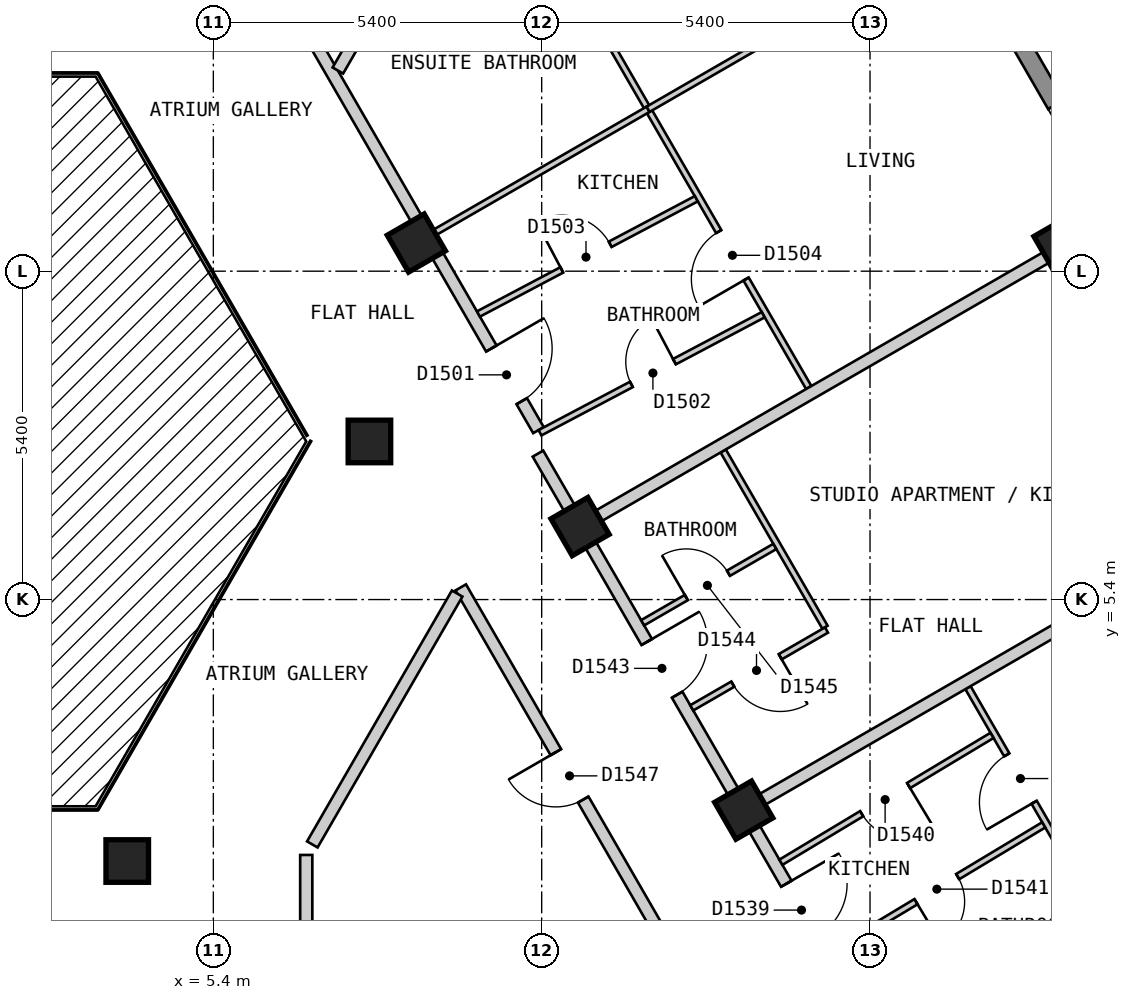
"""IFC4 building model, lengths in metres.
Left out: names, types, materials, properties, quantities, classifications, styles, units other than length and angle.
Written with IfcOpenShell. Run it as: python <this file> out.ifc"""

import sys

from ifc_helpers import new_model, si_unit, direction, frame, frame_2d, origin, origin_2d, place, context, subcontext, project, spatial, polyline, rectangle, outline, extrude, element, fill, save


model = new_model("IFC4")
c1 = context("Model", 3, precision=1e-05, world=origin(), true_north=direction((0.0, 1.0)))
c2 = subcontext(c1, "Body", "Model", "MODEL_VIEW")
j1 = project(units=[si_unit("LENGTHUNIT", "METRE"), si_unit("PLANEANGLEUNIT", "RADIAN")], contexts=[c1])
p1 = place(None, origin())
s1 = spatial("IfcSite", under=j1, at=p1, CompositionType="ELEMENT")
p2 = place(p1, origin())
s2 = spatial("IfcBuilding", under=s1, at=p2, CompositionType="ELEMENT")
p3 = place(p2, frame((0.0, 0.0, 196.2)))
s3 = spatial("IfcBuildingStorey", under=s2, at=p3, CompositionType="ELEMENT", Elevation=196.2)
p4 = place(p3, frame((19.442, 11.225, 0.0), z_axis=(0.0, 0.0, 1.0), x_axis=(-0.5, 0.866025403784, 0.0)))
e1 = element("IfcColumn", 1, at=p4, inside=s3, PredefinedType="COLUMN", context=c2, shape_type="SweptSolid", body=[
    extrude(rectangle(XDim=0.8, YDim=0.8, at=origin_2d()), origin(), (0.0, 0.0, 1.0), 3.0),
])
for number, where, z_axis, x_axis in (
    (2, (14.123, 1.937, 0.0), (0.0, 0.0, 1.0), (-0.5, 0.866, 0.0)),
    (3, (3.984, 1.1, 0.0), (0.0, 0.0, 1.0), (1.0, 0.0, 0.0)),
    (4, (11.431, 6.6, 0.0), (0.0, 0.0, 1.0), (-0.5, 0.866, 0.0)),
    (5, (7.967, 8.0, 0.0), (0.0, 0.0, 1.0), (1.0, 0.0, 0.0)),
    (6, (8.739, 11.263, 0.0), (0.0, 0.0, 1.0), (-0.5, 0.866, 0.0)),
):
    element("IfcColumn", number, at=place(p3, frame(where, z_axis=z_axis, x_axis=x_axis)), inside=s3, PredefinedType="COLUMN", context=c2, shape_type="SweptSolid", body=[
        extrude(rectangle(XDim=0.7, YDim=0.7, at=origin_2d()), origin(), (0.0, 0.0, 1.0), 3.0),
    ])
p5 = place(p3, frame((26.024, 1.825, 0.0), z_axis=(0.0, 0.0, 1.0), x_axis=(-0.500010537973, 0.866019319597, 0.0)))
e7 = element("IfcWall", 7, at=p5, inside=s3, PredefinedType="SOLIDWALL", context=c2, shape_type="SweptSolid", body=[
    extrude(outline(polyline([(0.0, -0.15), (22.863, -0.15), (22.783, 0.15), (0.08, 0.15), (0.0, -0.15)])), origin(), (0.0, 0.0, 1.0), 2.6),
])
p6 = place(p5, frame((1.259, 0.0, 0.15)))
e8 = element("IfcOpeningElement", 8, at=p6, cuts=e7, PredefinedType="OPENING", context=c2, shape_type="SweptSolid", body=[
    extrude(rectangle(XDim=1.5, YDim=2.1, at=frame_2d((0.75, 1.05))), frame((0.0, 0.16, 0.0), z_axis=(0.0, -1.0, 0.0), x_axis=(1.0, 0.0, 0.0)), (0.0, 0.0, 1.0), 0.32),
])
p7 = place(p5, frame((3.952, 0.0, 0.15)))
e9 = element("IfcOpeningElement", 9, at=p7, cuts=e7, PredefinedType="OPENING", context=c2, shape_type="SweptSolid", body=[
    extrude(rectangle(XDim=1.5, YDim=2.1, at=frame_2d((0.75, 1.05))), frame((0.0, 0.16, 0.0), z_axis=(0.0, -1.0, 0.0), x_axis=(1.0, 0.0, 0.0)), (0.0, 0.0, 1.0), 0.32),
])
p8 = place(p5, frame((6.644, 0.0, 0.15)))
e10 = element("IfcOpeningElement", 10, at=p8, cuts=e7, PredefinedType="OPENING", context=c2, shape_type="SweptSolid", body=[
    extrude(rectangle(XDim=1.5, YDim=2.1, at=frame_2d((0.75, 1.05))), frame((0.0, 0.16, 0.0), z_axis=(0.0, -1.0, 0.0), x_axis=(1.0, 0.0, 0.0)), (0.0, 0.0, 1.0), 0.32),
])
p9 = place(p5, frame((9.335, 0.0, 0.15)))
e11 = element("IfcOpeningElement", 11, at=p9, cuts=e7, PredefinedType="OPENING", context=c2, shape_type="SweptSolid", body=[
    extrude(rectangle(XDim=1.5, YDim=2.1, at=frame_2d((0.75, 1.05))), frame((0.0, 0.16, 0.0), z_axis=(0.0, -1.0, 0.0), x_axis=(1.0, 0.0, 0.0)), (0.0, 0.0, 1.0), 0.32),
])
p10 = place(p5, frame((12.028, 0.0, 0.15)))
e12 = element("IfcOpeningElement", 12, at=p10, cuts=e7, PredefinedType="OPENING", context=c2, shape_type="SweptSolid", body=[
    extrude(rectangle(XDim=1.5, YDim=2.1, at=frame_2d((0.75, 1.05))), frame((0.0, 0.16, 0.0), z_axis=(0.0, -1.0, 0.0), x_axis=(1.0, 0.0, 0.0)), (0.0, 0.0, 1.0), 0.32),
])
p11 = place(p5, frame((14.72, 0.0, 0.15)))
e13 = element("IfcOpeningElement", 13, at=p11, cuts=e7, PredefinedType="OPENING", context=c2, shape_type="SweptSolid", body=[
    extrude(rectangle(XDim=1.5, YDim=2.1, at=frame_2d((0.75, 1.05))), frame((0.0, 0.16, 0.0), z_axis=(0.0, -1.0, 0.0), x_axis=(1.0, 0.0, 0.0)), (0.0, 0.0, 1.0), 0.32),
])
p12 = place(p5, frame((17.411, 0.0, 0.15)))
e14 = element("IfcOpeningElement", 14, at=p12, cuts=e7, PredefinedType="OPENING", context=c2, shape_type="SweptSolid", body=[
    extrude(rectangle(XDim=1.5, YDim=2.1, at=frame_2d((0.75, 1.05))), frame((0.0, 0.16, 0.0), z_axis=(0.0, -1.0, 0.0), x_axis=(1.0, 0.0, 0.0)), (0.0, 0.0, 1.0), 0.32),
])
p13 = place(p5, frame((20.104, 0.0, 0.15)))
e15 = element("IfcOpeningElement", 15, at=p13, cuts=e7, PredefinedType="OPENING", context=c2, shape_type="SweptSolid", body=[
    extrude(rectangle(XDim=1.5, YDim=2.1, at=frame_2d((0.75, 1.05))), frame((0.0, 0.16, 0.0), z_axis=(0.0, -1.0, 0.0), x_axis=(1.0, 0.0, 0.0)), (0.0, 0.0, 1.0), 0.32),
])
p14 = place(p3, frame((9.469, 5.6, 0.0), z_axis=(0.0, 0.0, 1.0), x_axis=(0.499964524401, -0.866045884662, 0.0)))
e16 = element("IfcWall", 16, at=p14, inside=s3, PredefinedType="PARTITIONING", context=c2, shape_type="SweptSolid", body=[
    extrude(rectangle(XDim=7.042, YDim=0.2, at=frame_2d((3.521, 0.0))), origin(), (0.0, 0.0, 1.0), 2.6),
])
p15 = place(p14, frame((3.129, 0.0, 0.0)))
e17 = element("IfcOpeningElement", 17, at=p15, cuts=e16, PredefinedType="OPENING", context=c2, shape_type="SweptSolid", body=[
    extrude(rectangle(XDim=0.9, YDim=2.1, at=frame_2d((0.45, 1.05))), frame((0.0, 0.11, 0.0), z_axis=(0.0, -1.0, 0.0), x_axis=(1.0, 0.0, 0.0)), (0.0, 0.0, 1.0), 0.22),
])
p16 = place(p3, frame((10.739, 7.8, 0.0), z_axis=(0.0, 0.0, 1.0), x_axis=(0.500023726918, -0.866011704609, 0.0)))
e18 = element("IfcWall", 18, at=p16, inside=s3, PredefinedType="PARTITIONING", context=c2, shape_type="SweptSolid", body=[
    extrude(rectangle(XDim=9.47, YDim=0.2, at=frame_2d((4.735, 0.0))), origin(), (0.0, 0.0, 1.0), 2.6),
])
p17 = place(p16, frame((8.168, 0.0, 0.0)))
e19 = element("IfcOpeningElement", 19, at=p17, cuts=e18, PredefinedType="OPENING", context=c2, shape_type="SweptSolid", body=[
    extrude(rectangle(XDim=1.0, YDim=2.1, at=frame_2d((0.5, 1.05))), frame((0.0, 0.11, 0.0), z_axis=(0.0, -1.0, 0.0), x_axis=(1.0, 0.0, 0.0)), (0.0, 0.0, 1.0), 0.22),
])
p18 = place(p16, frame((3.578, 0.0, 0.0)))
e20 = element("IfcOpeningElement", 20, at=p18, cuts=e18, PredefinedType="OPENING", context=c2, shape_type="SweptSolid", body=[
    extrude(rectangle(XDim=1.0, YDim=2.1, at=frame_2d((0.5, 1.05))), frame((0.0, 0.11, 0.0), z_axis=(0.0, -1.0, 0.0), x_axis=(1.0, 0.0, 0.0)), (0.0, 0.0, 1.0), 0.22),
])
p19 = place(p3, frame((5.485, 17.3, 0.0), z_axis=(0.0, 0.0, 1.0), x_axis=(0.499998905622, -0.866026035623, 0.0)))
e21 = element("IfcWall", 21, at=p19, inside=s3, PredefinedType="PARTITIONING", context=c2, shape_type="SweptSolid", body=[
    extrude(rectangle(XDim=10.524, YDim=0.2, at=frame_2d((5.262, 0.0))), origin(), (0.0, 0.0, 1.0), 2.6),
])
p20 = place(p19, frame((8.974, 0.0, 0.0)))
e22 = element("IfcOpeningElement", 22, at=p20, cuts=e21, PredefinedType="OPENING", context=c2, shape_type="SweptSolid", body=[
    extrude(rectangle(XDim=1.0, YDim=2.1, at=frame_2d((0.5, 1.05))), frame((0.0, 0.11, 0.0), z_axis=(0.0, -1.0, 0.0), x_axis=(1.0, 0.0, 0.0)), (0.0, 0.0, 1.0), 0.22),
])
p21 = place(p3, frame((7.028, 1.373, 0.0), z_axis=(0.0, 0.0, 1.0), x_axis=(0.499953126767, 0.866052464367, 0.0)))
e23 = element("IfcWall", 23, at=p21, inside=s3, PredefinedType="PARTITIONING", context=c2, shape_type="SweptSolid", body=[
    extrude(rectangle(XDim=4.764, YDim=0.2, at=frame_2d((2.382, 0.0))), origin(), (0.0, 0.0, 1.0), 2.6),
])
p22 = place(p3, frame((6.928, -2.8, 0.0), z_axis=(0.0, 0.0, 1.0), x_axis=(0.0, 1.0, 0.0)))
e24 = element("IfcWall", 24, at=p22, inside=s3, PredefinedType="PARTITIONING", context=c2, shape_type="SweptSolid", body=[
    extrude(rectangle(XDim=4.0, YDim=0.2, at=frame_2d((2.0, 0.0))), origin(), (0.0, 0.0, 1.0), 2.6),
])
p23 = place(p3, frame((13.785, 7.844, 0.0), z_axis=(0.0, 0.0, 1.0), x_axis=(0.500176784828, -0.865923312955, 0.0)))
e25 = element("IfcWall", 25, at=p23, inside=s3, PredefinedType="PARTITIONING", context=c2, shape_type="SweptSolid", body=[
    extrude(rectangle(XDim=3.349, YDim=0.1, at=frame_2d((1.674, 0.0))), origin(), (0.0, 0.0, 1.0), 2.6),
])
p24 = place(p3, frame((17.811, 3.951, 0.0), z_axis=(0.0, 0.0, 1.0), x_axis=(0.499976149225, -0.866039173598, 0.0)))
e26 = element("IfcWall", 26, at=p24, inside=s3, PredefinedType="PARTITIONING", context=c2, shape_type="SweptSolid", body=[
    extrude(rectangle(XDim=2.888, YDim=0.1, at=frame_2d((1.444, 0.0))), origin(), (0.0, 0.0, 1.0), 2.6),
])
p25 = place(p24, frame((1.276, 0.0, 0.0)))
e27 = element("IfcOpeningElement", 27, at=p25, cuts=e26, PredefinedType="OPENING", context=c2, shape_type="SweptSolid", body=[
    extrude(rectangle(XDim=0.9, YDim=2.1, at=frame_2d((0.45, 1.05))), frame((0.0, 0.06, 0.0), z_axis=(0.0, -1.0, 0.0), x_axis=(1.0, 0.0, 0.0)), (0.0, 0.0, 1.0), 0.12),
])
p26 = place(p3, frame((9.883, 18.082, 0.0), z_axis=(0.0, 0.0, 1.0), x_axis=(0.500004428835, -0.86602284678, 0.0)))
e28 = element("IfcWall", 28, at=p26, inside=s3, PredefinedType="PARTITIONING", context=c2, shape_type="SweptSolid", body=[
    extrude(rectangle(XDim=10.618, YDim=0.1, at=frame_2d((5.309, 0.0))), origin(), (0.0, 0.0, 1.0), 2.6),
])
p27 = place(p26, frame((7.657, 0.0, 0.0)))
e29 = element("IfcOpeningElement", 29, at=p27, cuts=e28, PredefinedType="OPENING", context=c2, shape_type="SweptSolid", body=[
    extrude(rectangle(XDim=0.9, YDim=2.1, at=frame_2d((0.45, 1.05))), frame((0.0, 0.06, 0.0), z_axis=(0.0, -1.0, 0.0), x_axis=(1.0, 0.0, 0.0)), (0.0, 0.0, 1.0), 0.12),
])
p28 = place(p26, frame((2.242, 0.0, 0.0)))
e30 = element("IfcOpeningElement", 30, at=p28, cuts=e28, PredefinedType="OPENING", context=c2, shape_type="SweptSolid", body=[
    extrude(rectangle(XDim=0.8, YDim=2.1, at=frame_2d((0.4, 1.05))), frame((0.0, 0.06, 0.0), z_axis=(0.0, -1.0, 0.0), x_axis=(1.0, 0.0, 0.0)), (0.0, 0.0, 1.0), 0.12),
])
p29 = place(p3, frame((9.76, 10.096, 0.0), z_axis=(0.0, 0.0, 1.0), x_axis=(0.883925629136, 0.467627503636, 0.0)))
e31 = element("IfcWall", 31, at=p29, inside=s3, PredefinedType="PARTITIONING", context=c2, shape_type="SweptSolid", body=[
    extrude(rectangle(XDim=4.052, YDim=0.1, at=frame_2d((2.026, 0.0))), origin(), (0.0, 0.0, 1.0), 2.6),
])
p30 = place(p29, frame((1.551, 0.0, 0.0)))
e32 = element("IfcOpeningElement", 32, at=p30, cuts=e31, PredefinedType="OPENING", context=c2, shape_type="SweptSolid", body=[
    extrude(rectangle(XDim=0.9, YDim=2.1, at=frame_2d((0.45, 1.05))), frame((0.0, 0.06, 0.0), z_axis=(0.0, -1.0, 0.0), x_axis=(1.0, 0.0, 0.0)), (0.0, 0.0, 1.0), 0.12),
])
p31 = place(p3, frame((10.772, 8.143, 0.0), z_axis=(0.0, 0.0, 1.0), x_axis=(0.884049480227, 0.467393320995, 0.0)))
e33 = element("IfcWall", 33, at=p31, inside=s3, PredefinedType="PARTITIONING", context=c2, shape_type="SweptSolid", body=[
    extrude(rectangle(XDim=4.153, YDim=0.1, at=frame_2d((2.076, 0.0))), origin(), (0.0, 0.0, 1.0), 2.6),
])
p32 = place(p31, frame((1.701, 0.0, 0.0)))
e34 = element("IfcOpeningElement", 34, at=p32, cuts=e33, PredefinedType="OPENING", context=c2, shape_type="SweptSolid", body=[
    extrude(rectangle(XDim=0.8, YDim=2.1, at=frame_2d((0.4, 1.05))), frame((0.0, 0.06, 0.0), z_axis=(0.0, -1.0, 0.0), x_axis=(1.0, 0.0, 0.0)), (0.0, 0.0, 1.0), 0.12),
])
p33 = place(p3, frame((13.268, 3.619, 0.0), z_axis=(0.0, 0.0, 1.0), x_axis=(0.865902724456, 0.500212426655, 0.0)))
e35 = element("IfcWall", 35, at=p33, inside=s3, PredefinedType="PARTITIONING", context=c2, shape_type="SweptSolid", body=[
    extrude(rectangle(XDim=2.559, YDim=0.1, at=frame_2d((1.28, 0.0))), origin(), (0.0, 0.0, 1.0), 2.6),
])
p34 = place(p33, frame((0.78, 0.0, 0.0)))
e36 = element("IfcOpeningElement", 36, at=p34, cuts=e35, PredefinedType="OPENING", context=c2, shape_type="SweptSolid", body=[
    extrude(rectangle(XDim=0.9, YDim=2.1, at=frame_2d((0.45, 1.05))), frame((0.0, 0.06, 0.0), z_axis=(0.0, -1.0, 0.0), x_axis=(1.0, 0.0, 0.0)), (0.0, 0.0, 1.0), 0.12),
])
p35 = place(p3, frame((12.46, 5.018, 0.0), z_axis=(0.0, 0.0, 1.0), x_axis=(0.866080321209, 0.499904868165, 0.0)))
e37 = element("IfcWall", 37, at=p35, inside=s3, PredefinedType="PARTITIONING", context=c2, shape_type="SweptSolid", body=[
    extrude(rectangle(XDim=2.51, YDim=0.1, at=frame_2d((1.255, 0.0))), origin(), (0.0, 0.0, 1.0), 2.6),
])
p36 = place(p35, frame((0.83, 0.0, 0.0)))
e38 = element("IfcOpeningElement", 38, at=p36, cuts=e37, PredefinedType="OPENING", context=c2, shape_type="SweptSolid", body=[
    extrude(rectangle(XDim=0.8, YDim=2.1, at=frame_2d((0.4, 1.05))), frame((0.0, 0.06, 0.0), z_axis=(0.0, -1.0, 0.0), x_axis=(1.0, 0.0, 0.0)), (0.0, 0.0, 1.0), 0.12),
])
p37 = place(p3, frame((8.999, 11.413, 0.0), z_axis=(0.0, 0.0, 1.0), x_axis=(0.86606561423, 0.499930346997, 0.0)))
e39 = element("IfcWall", 39, at=p37, inside=s3, PredefinedType="PARTITIONING", context=c2, shape_type="SweptSolid", body=[
    extrude(rectangle(XDim=4.1, YDim=0.1, at=frame_2d((2.05, 0.0))), origin(), (0.0, 0.0, 1.0), 2.6),
])
p38 = place(p3, frame((14.734, 1.08, 0.0), z_axis=(0.0, 0.0, 1.0), x_axis=(0.857205608004, 0.514974315482, 0.0)))
e40 = element("IfcWall", 40, at=p38, inside=s3, PredefinedType="PARTITIONING", context=c2, shape_type="SweptSolid", body=[
    extrude(rectangle(XDim=4.051, YDim=0.1, at=frame_2d((2.025, 0.0))), origin(), (0.0, 0.0, 1.0), 2.6),
])
p39 = place(p38, frame((1.55, 0.0, 0.0)))
e41 = element("IfcOpeningElement", 41, at=p39, cuts=e40, PredefinedType="OPENING", context=c2, shape_type="SweptSolid", body=[
    extrude(rectangle(XDim=0.9, YDim=2.1, at=frame_2d((0.45, 1.05))), frame((0.0, 0.06, 0.0), z_axis=(0.0, -1.0, 0.0), x_axis=(1.0, 0.0, 0.0)), (0.0, 0.0, 1.0), 0.12),
])
p40 = place(p3, frame((15.499, -0.444, 0.0), z_axis=(0.0, 0.0, 1.0), x_axis=(0.857061798163, 0.515213619899, 0.0)))
e42 = element("IfcWall", 42, at=p40, inside=s3, PredefinedType="PARTITIONING", context=c2, shape_type="SweptSolid", body=[
    extrude(rectangle(XDim=4.15, YDim=0.1, at=frame_2d((2.075, 0.0))), origin(), (0.0, 0.0, 1.0), 2.6),
])
p41 = place(p40, frame((1.7, 0.0, 0.0)))
e43 = element("IfcOpeningElement", 43, at=p41, cuts=e42, PredefinedType="OPENING", context=c2, shape_type="SweptSolid", body=[
    extrude(rectangle(XDim=0.8, YDim=2.1, at=frame_2d((0.4, 1.05))), frame((0.0, 0.06, 0.0), z_axis=(0.0, -1.0, 0.0), x_axis=(1.0, 0.0, 0.0)), (0.0, 0.0, 1.0), 0.12),
])
p42 = place(p3, frame((7.448, 14.1, 0.0), z_axis=(0.0, 0.0, 1.0), x_axis=(0.499961462843, 0.866047652079, 0.0)))
e44 = element("IfcWall", 44, at=p42, inside=s3, PredefinedType="PARTITIONING", context=c2, shape_type="SweptSolid", body=[
    extrude(rectangle(XDim=4.362, YDim=0.2, at=frame_2d((2.181, 0.0))), origin(), (0.0, 0.0, 1.0), 2.6),
])
p43 = place(p3, frame((14.21, 1.987, 0.0), z_axis=(0.0, 0.0, 1.0), x_axis=(0.866022959057, 0.500004234368, 0.0)))
e45 = element("IfcWall", 45, at=p43, inside=s3, PredefinedType="PARTITIONING", context=c2, shape_type="SweptSolid", body=[
    extrude(rectangle(XDim=10.0, YDim=0.2, at=frame_2d((5.0, 0.0))), origin(), (0.0, 0.0, 1.0), 2.6),
])
p44 = place(p3, frame((11.518, 6.65, 0.0), z_axis=(0.0, 0.0, 1.0), x_axis=(0.866016855193, 0.500014806302, 0.0)))
e46 = element("IfcWall", 46, at=p44, inside=s3, PredefinedType="PARTITIONING", context=c2, shape_type="SweptSolid", body=[
    extrude(rectangle(XDim=10.0, YDim=0.2, at=frame_2d((5.0, 0.0))), origin(), (0.0, 0.0, 1.0), 2.6),
])
p45 = place(p3, frame((12.55, 13.463, 0.0), z_axis=(0.0, 0.0, 1.0), x_axis=(0.866004402611, 0.500036373335, 0.0)))
e47 = element("IfcWall", 47, at=p45, inside=s3, PredefinedType="PARTITIONING", context=c2, shape_type="SweptSolid", body=[
    extrude(rectangle(XDim=5.7, YDim=0.1, at=frame_2d((2.85, 0.0))), origin(), (0.0, 0.0, 1.0), 2.6),
])
p46 = place(p45, frame((2.4, 0.0, 0.0)))
e48 = element("IfcOpeningElement", 48, at=p46, cuts=e47, PredefinedType="OPENING", context=c2, shape_type="SweptSolid", body=[
    extrude(rectangle(XDim=0.9, YDim=2.1, at=frame_2d((0.45, 1.05))), frame((0.0, 0.06, 0.0), z_axis=(0.0, -1.0, 0.0), x_axis=(1.0, 0.0, 0.0)), (0.0, 0.0, 1.0), 0.12),
])
p47 = place(p20, origin())
e49 = element("IfcDoor", 49, at=p47, inside=s3, OperationType="SINGLE_SWING_LEFT", PredefinedType="DOOR", context=c2, shape_type="SweptSolid", body=[
    extrude(rectangle(XDim=1.0, YDim=2.1, at=frame_2d((0.5, 1.05))), frame((0.0, 0.025, 0.0), z_axis=(0.0, -1.0, 0.0), x_axis=(1.0, 0.0, 0.0)), (0.0, 0.0, 1.0), 0.05),
])
fill(e22, e49)
p48 = place(p32, origin())
e50 = element("IfcDoor", 50, at=p48, inside=s3, OperationType="SINGLE_SWING_RIGHT", PredefinedType="DOOR", context=c2, shape_type="SweptSolid", body=[
    extrude(rectangle(XDim=0.8, YDim=2.1, at=frame_2d((0.4, 1.05))), frame((0.0, 0.025, 0.0), z_axis=(0.0, -1.0, 0.0), x_axis=(1.0, 0.0, 0.0)), (0.0, 0.0, 1.0), 0.05),
])
fill(e34, e50)
p49 = place(p30, origin())
e51 = element("IfcDoor", 51, at=p49, inside=s3, OperationType="SINGLE_SWING_LEFT", PredefinedType="DOOR", context=c2, shape_type="SweptSolid", body=[
    extrude(rectangle(XDim=0.9, YDim=2.1, at=frame_2d((0.45, 1.05))), frame((0.0, 0.025, 0.0), z_axis=(0.0, -1.0, 0.0), x_axis=(1.0, 0.0, 0.0)), (0.0, 0.0, 1.0), 0.05),
])
fill(e32, e51)
p50 = place(p27, origin())
e52 = element("IfcDoor", 52, at=p50, inside=s3, OperationType="SINGLE_SWING_RIGHT", PredefinedType="DOOR", context=c2, shape_type="SweptSolid", body=[
    extrude(rectangle(XDim=0.9, YDim=2.1, at=frame_2d((0.45, 1.05))), frame((0.0, 0.025, 0.0), z_axis=(0.0, -1.0, 0.0), x_axis=(1.0, 0.0, 0.0)), (0.0, 0.0, 1.0), 0.05),
])
fill(e29, e52)
p51 = place(p17, origin())
e53 = element("IfcDoor", 53, at=p51, inside=s3, OperationType="SINGLE_SWING_LEFT", PredefinedType="DOOR", context=c2, shape_type="SweptSolid", body=[
    extrude(rectangle(XDim=1.0, YDim=2.1, at=frame_2d((0.5, 1.05))), frame((0.0, 0.025, 0.0), z_axis=(0.0, -1.0, 0.0), x_axis=(1.0, 0.0, 0.0)), (0.0, 0.0, 1.0), 0.05),
])
fill(e19, e53)
p52 = place(p39, origin())
e54 = element("IfcDoor", 54, at=p52, inside=s3, OperationType="SINGLE_SWING_RIGHT", PredefinedType="DOOR", context=c2, shape_type="SweptSolid", body=[
    extrude(rectangle(XDim=0.9, YDim=2.1, at=frame_2d((0.45, 1.05))), frame((0.0, 0.025, 0.0), z_axis=(0.0, -1.0, 0.0), x_axis=(1.0, 0.0, 0.0)), (0.0, 0.0, 1.0), 0.05),
])
fill(e41, e54)
p53 = place(p41, origin())
e55 = element("IfcDoor", 55, at=p53, inside=s3, OperationType="SINGLE_SWING_LEFT", PredefinedType="DOOR", context=c2, shape_type="SweptSolid", body=[
    extrude(rectangle(XDim=0.8, YDim=2.1, at=frame_2d((0.4, 1.05))), frame((0.0, 0.025, 0.0), z_axis=(0.0, -1.0, 0.0), x_axis=(1.0, 0.0, 0.0)), (0.0, 0.0, 1.0), 0.05),
])
fill(e43, e55)
p54 = place(p25, origin())
e56 = element("IfcDoor", 56, at=p54, inside=s3, OperationType="SINGLE_SWING_RIGHT", PredefinedType="DOOR", context=c2, shape_type="SweptSolid", body=[
    extrude(rectangle(XDim=0.9, YDim=2.1, at=frame_2d((0.45, 1.05))), frame((0.0, 0.025, 0.0), z_axis=(0.0, -1.0, 0.0), x_axis=(1.0, 0.0, 0.0)), (0.0, 0.0, 1.0), 0.05),
])
fill(e27, e56)
p55 = place(p18, origin())
e57 = element("IfcDoor", 57, at=p55, inside=s3, OperationType="SINGLE_SWING_LEFT", PredefinedType="DOOR", context=c2, shape_type="SweptSolid", body=[
    extrude(rectangle(XDim=1.0, YDim=2.1, at=frame_2d((0.5, 1.05))), frame((0.0, 0.025, 0.0), z_axis=(0.0, -1.0, 0.0), x_axis=(1.0, 0.0, 0.0)), (0.0, 0.0, 1.0), 0.05),
])
fill(e20, e57)
p56 = place(p34, origin())
e58 = element("IfcDoor", 58, at=p56, inside=s3, OperationType="SINGLE_SWING_RIGHT", PredefinedType="DOOR", context=c2, shape_type="SweptSolid", body=[
    extrude(rectangle(XDim=0.9, YDim=2.1, at=frame_2d((0.45, 1.05))), frame((0.0, 0.025, 0.0), z_axis=(0.0, -1.0, 0.0), x_axis=(1.0, 0.0, 0.0)), (0.0, 0.0, 1.0), 0.05),
])
fill(e36, e58)
p57 = place(p36, origin())
e59 = element("IfcDoor", 59, at=p57, inside=s3, OperationType="SINGLE_SWING_LEFT", PredefinedType="DOOR", context=c2, shape_type="SweptSolid", body=[
    extrude(rectangle(XDim=0.8, YDim=2.1, at=frame_2d((0.4, 1.05))), frame((0.0, 0.025, 0.0), z_axis=(0.0, -1.0, 0.0), x_axis=(1.0, 0.0, 0.0)), (0.0, 0.0, 1.0), 0.05),
])
fill(e38, e59)
p58 = place(p15, origin())
e60 = element("IfcDoor", 60, at=p58, inside=s3, OperationType="SINGLE_SWING_LEFT", PredefinedType="DOOR", context=c2, shape_type="SweptSolid", body=[
    extrude(rectangle(XDim=0.9, YDim=2.1, at=frame_2d((0.45, 1.05))), frame((0.0, 0.025, 0.0), z_axis=(0.0, -1.0, 0.0), x_axis=(1.0, 0.0, 0.0)), (0.0, 0.0, 1.0), 0.05),
])
fill(e17, e60)
save(model, sys.argv[1])
